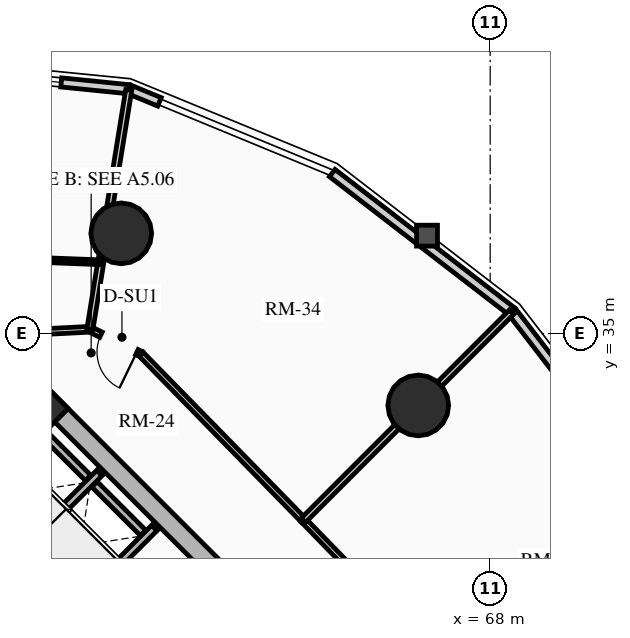
"""IFC4 building model, lengths in metres.
Left out: names, types, materials, properties, quantities, classifications, styles, units other than length and angle.
Written with IfcOpenShell. Run it as: python <this file> out.ifc"""

import sys

from ifc_helpers import new_model, si_unit, direction, frame, frame_2d, origin, origin_2d, place, context, subcontext, project, spatial, rectangle, circle, extrude, source, transform, mapped, element, fill, save


model = new_model("IFC4")
c1 = context("Model", 3, precision=1e-05, world=origin(), true_north=direction((0.0, 1.0)))
c2 = subcontext(c1, "Body", "Model", "MODEL_VIEW")
j1 = project(units=[si_unit("LENGTHUNIT", "METRE"), si_unit("PLANEANGLEUNIT", "RADIAN")], contexts=[c1])
p1 = place(None, origin())
s1 = spatial("IfcSite", under=j1, at=p1, CompositionType="ELEMENT")
p2 = place(p1, origin())
s2 = spatial("IfcBuilding", under=s1, at=p2, CompositionType="ELEMENT")
p3 = place(p2, frame((0.0, 0.0, 59.83)))
s3 = spatial("IfcBuildingStorey", under=s2, at=p3, CompositionType="ELEMENT", Elevation=59.83)
p4 = place(p3, frame((66.339, 23.227, 0.0), z_axis=(0.0, 0.0, 1.0), x_axis=(-0.707106781187, 0.707106781187, 0.0)))
e1 = element("IfcWall", 1, at=p4, inside=s3, PredefinedType="SHEAR", context=c2, shape_type="SweptSolid", body=[
    extrude(rectangle(XDim=14.3, YDim=0.5, at=frame_2d((7.15, 0.0))), origin(), (0.0, 0.0, 1.0), 2.91),
])
p5 = place(p3, frame((48.838, 25.596, 0.0), z_axis=(0.0, 0.0, 1.0), x_axis=(0.707106781187, 0.707106781187, 0.0)))
e2 = element("IfcWall", 2, at=p5, inside=s3, PredefinedType="SHEAR", context=c2, shape_type="SweptSolid", body=[
    extrude(rectangle(XDim=10.7, YDim=0.5, at=frame_2d((5.35, 0.0))), origin(), (0.0, 0.0, 1.0), 2.91),
])
m1 = source(origin(), c2, "Body", "SweptSolid", [
    extrude(rectangle(XDim=1.5, YDim=2.02, at=frame_2d((0.75, 1.01))), frame((0.0, 0.26, 0.0), z_axis=(0.0, -1.0, 0.0), x_axis=(1.0, 0.0, 0.0)), (0.0, 0.0, 1.0), 0.52),
])
p6 = place(p5, frame((4.6, 0.0, 0.0)))
e3 = element("IfcOpeningElement", 3, at=p6, cuts=e2, PredefinedType="OPENING", context=c2, shape_type="MappedRepresentation", body=[
    mapped(m1, transform((0.0, 0.0, 0.0), x_axis=(1.0, 0.0, 0.0), y_axis=(0.0, 1.0, 0.0), z_axis=(0.0, 0.0, 1.0), scale=1.0)),
])
p7 = place(p3, frame((63.662, 20.904, 0.0), z_axis=(0.0, 0.0, 1.0), x_axis=(-0.707106781187, 0.707106781187, 0.0)))
e4 = element("IfcWall", 4, at=p7, inside=s3, PredefinedType="SHEAR", context=c2, shape_type="SweptSolid", body=[
    extrude(rectangle(XDim=13.8, YDim=0.35, at=frame_2d((6.9, 0.0))), origin(), (0.0, 0.0, 1.0), 2.91),
])
m2 = source(origin(), c2, "Body", "SweptSolid", [
    extrude(rectangle(XDim=1.1, YDim=2.015, at=frame_2d((0.55, 1.007))), frame((0.0, 0.185, 0.0), z_axis=(0.0, -1.0, 0.0), x_axis=(1.0, 0.0, 0.0)), (0.0, 0.0, 1.0), 0.37),
])
p8 = place(p7, frame((10.025, 0.0, 0.0)))
e5 = element("IfcOpeningElement", 5, at=p8, cuts=e4, PredefinedType="OPENING", context=c2, shape_type="MappedRepresentation", body=[
    mapped(m2, transform((0.0, 0.0, 0.0), x_axis=(1.0, 0.0, 0.0), y_axis=(0.0, 1.0, 0.0), z_axis=(0.0, 0.0, 1.0), scale=1.0)),
])
p9 = place(p7, frame((12.025, 0.0, 0.0)))
e6 = element("IfcOpeningElement", 6, at=p9, cuts=e4, PredefinedType="OPENING", context=c2, shape_type="MappedRepresentation", body=[
    mapped(m2, transform((0.0, 0.0, 0.0), x_axis=(1.0, 0.0, 0.0), y_axis=(0.0, 1.0, 0.0), z_axis=(0.0, 0.0, 1.0), scale=1.0)),
])
m3 = source(origin(), c2, "Body", "SweptSolid", [
    extrude(rectangle(XDim=1.15, YDim=2.02, at=frame_2d((0.575, 1.01))), frame((0.0, 0.185, 0.0), z_axis=(0.0, -1.0, 0.0), x_axis=(1.0, 0.0, 0.0)), (0.0, 0.0, 1.0), 0.37),
])
p10 = place(p7, frame((5.33, 0.0, 0.0)))
e7 = element("IfcOpeningElement", 7, at=p10, cuts=e4, PredefinedType="OPENING", context=c2, shape_type="MappedRepresentation", body=[
    mapped(m3, transform((0.0, 0.0, 0.0), x_axis=(1.0, 0.0, 0.0), y_axis=(0.0, 1.0, 0.0), z_axis=(0.0, 0.0, 1.0), scale=1.0)),
])
p11 = place(p3, frame((56.294, 33.024, 0.0), z_axis=(0.0, 0.0, 1.0), x_axis=(0.707106781187, 0.707106781187, 0.0)))
e8 = element("IfcColumn", 8, at=p11, inside=s3, PredefinedType="COLUMN", context=c2, shape_type="SweptSolid", body=[
    extrude(rectangle(XDim=0.85, YDim=0.85, at=origin_2d()), origin(), (0.0, 0.0, 1.0), 2.91),
])
for number, where, z_axis, x_axis in (
    (9, (66.107, 33.107, 0.0), (0.0, 0.0, 1.0), (1.0, 0.0, 0.0)),
    (10, (58.291, 37.635, 0.0), (0.0, 0.0, 1.0), (1.0, 0.0, 0.0)),
):
    element("IfcColumn", number, at=place(p3, frame(where, z_axis=z_axis, x_axis=x_axis)), inside=s3, PredefinedType="USERDEFINED", context=c2, shape_type="SweptSolid", body=[
        extrude(circle(Radius=0.8, at=origin_2d()), origin(), (0.0, 0.0, 1.0), 2.91),
    ])
p12 = place(p3, frame((63.844, 39.222, 0.0), z_axis=(0.0, 0.0, 1.0), x_axis=(0.792014314407, -0.610502519057, 0.0)))
e11 = element("IfcWall", 11, at=p12, inside=s3, PredefinedType="SOLIDWALL", context=c2, shape_type="SweptSolid", body=[
    extrude(rectangle(XDim=5.973, YDim=0.24, at=frame_2d((2.987, 0.0))), origin(), (0.0, 0.0, 1.0), 2.073),
])
p13 = place(p3, frame((58.493, 41.428, 0.0), z_axis=(0.0, 0.0, 1.0), x_axis=(0.924556017656, -0.381046152345, 0.0)))
e12 = element("IfcWall", 12, at=p13, inside=s3, PredefinedType="SOLIDWALL", context=c2, shape_type="SweptSolid", body=[
    extrude(rectangle(XDim=0.87, YDim=0.24, at=frame_2d((0.435, 0.0))), origin(), (0.0, 0.0, 1.0), 2.073),
])
p14 = place(p3, frame((53.043, 41.976, 0.0), z_axis=(0.0, 0.0, 1.0), x_axis=(0.994970765694, -0.100165739718, 0.0)))
e13 = element("IfcWall", 13, at=p14, inside=s3, PredefinedType="SOLIDWALL", context=c2, shape_type="SweptSolid", body=[
    extrude(rectangle(XDim=5.477, YDim=0.24, at=frame_2d((2.738, 0.0))), origin(), (0.0, 0.0, 1.0), 2.073),
])
m4 = source(origin(), c2, "Body", "SweptSolid", [
    extrude(rectangle(XDim=1.9, YDim=1.35, at=frame_2d((0.95, 0.675))), frame((0.0, 0.13, 0.0), z_axis=(0.0, -1.0, 0.0), x_axis=(1.0, 0.0, 0.0)), (0.0, 0.0, 1.0), 0.26),
])
p15 = place(p14, frame((1.788, 0.0, 0.65)))
e14 = element("IfcOpeningElement", 14, at=p15, cuts=e13, PredefinedType="OPENING", context=c2, shape_type="MappedRepresentation", body=[
    mapped(m4, transform((0.0, 0.0, 0.0), x_axis=(1.0, 0.0, 0.0), y_axis=(0.0, 1.0, 0.0), z_axis=(0.0, 0.0, 1.0), scale=1.0)),
])
p16 = place(p3, frame((68.575, 35.575, 0.0), z_axis=(0.0, 0.0, 1.0), x_axis=(0.610502519057, -0.792014314407, 0.0)))
e15 = element("IfcWall", 15, at=p16, inside=s3, PredefinedType="SOLIDWALL", context=c2, shape_type="SweptSolid", body=[
    extrude(rectangle(XDim=5.973, YDim=0.24, at=frame_2d((2.987, 0.0))), origin(), (0.0, 0.0, 1.0), 2.073),
])
p17 = place(p16, frame((2.037, 0.0, 0.65)))
e16 = element("IfcOpeningElement", 16, at=p17, cuts=e15, PredefinedType="OPENING", context=c2, shape_type="MappedRepresentation", body=[
    mapped(m4, transform((0.0, 0.0, 0.0), x_axis=(1.0, 0.0, 0.0), y_axis=(0.0, 1.0, 0.0), z_axis=(0.0, 0.0, 1.0), scale=1.0)),
])
p18 = place(p3, frame((57.062, 27.781, 0.0), z_axis=(0.0, 0.0, 1.0), x_axis=(0.707106781187, 0.707106781187, 0.0)))
e17 = element("IfcWall", 17, at=p18, inside=s3, PredefinedType="SHEAR", context=c2, shape_type="SweptSolid", body=[
    extrude(rectangle(XDim=2.97, YDim=0.2, at=frame_2d((1.485, 0.0))), origin(), (0.0, 0.0, 1.0), 2.91),
])
p19 = place(p3, frame((55.615, 29.227, 0.0), z_axis=(0.0, 0.0, 1.0), x_axis=(0.707147878904, 0.70706568108, 0.0)))
e18 = element("IfcWall", 18, at=p19, inside=s3, PredefinedType="SHEAR", context=c2, shape_type="SweptSolid", body=[
    extrude(rectangle(XDim=2.97, YDim=0.2, at=frame_2d((1.485, 0.0))), origin(), (0.0, 0.0, 1.0), 2.91),
])
p20 = place(p3, frame((58.865, 29.754, 0.0), z_axis=(0.0, 0.0, 1.0), x_axis=(-0.707174411312, 0.707039144592, 0.0)))
e19 = element("IfcWall", 19, at=p20, inside=s3, PredefinedType="SHEAR", context=c2, shape_type="SweptSolid", body=[
    extrude(rectangle(XDim=1.805, YDim=0.2, at=frame_2d((0.902, 0.0))), origin(), (0.0, 0.0, 1.0), 2.91),
])
p21 = place(p3, frame((57.419, 31.2, 0.0), z_axis=(0.0, 0.0, 1.0), x_axis=(-0.707032117043, 0.707181437447, 0.0)))
e20 = element("IfcWall", 20, at=p21, inside=s3, PredefinedType="SHEAR", context=c2, shape_type="SweptSolid", body=[
    extrude(rectangle(XDim=1.635, YDim=0.2, at=frame_2d((0.817, 0.0))), origin(), (0.0, 0.0, 1.0), 2.91),
])
p22 = place(p3, frame((63.086, 30.086, 0.0), z_axis=(0.0, 0.0, 1.0), x_axis=(-0.699075897379, 0.715047473741, 0.0)))
e21 = element("IfcWall", 21, at=p22, inside=s3, PredefinedType="PARTITIONING", context=c2, shape_type="SweptSolid", body=[
    extrude(rectangle(XDim=6.114, YDim=0.15, at=frame_2d((3.057, 0.0))), origin(), (0.0, 0.0, 1.0), 2.159),
])
p23 = place(p3, frame((58.812, 34.458, 0.0), z_axis=(0.0, 0.0, 1.0), x_axis=(-0.899559490277, 0.436798264021, 0.0)))
e22 = element("IfcWall", 22, at=p23, inside=s3, PredefinedType="PARTITIONING", context=c2, shape_type="SweptSolid", body=[
    extrude(rectangle(XDim=1.495, YDim=0.15, at=frame_2d((0.748, 0.0))), origin(), (0.0, 0.0, 1.0), 2.205),
])
m5 = source(origin(), c2, "Body", "SweptSolid", [
    extrude(rectangle(XDim=1.05, YDim=2.015, at=frame_2d((0.525, 1.007))), frame((0.0, 0.085, 0.0), z_axis=(0.0, -1.0, 0.0), x_axis=(1.0, 0.0, 0.0)), (0.0, 0.0, 1.0), 0.17),
])
p24 = place(p23, frame((0.12, 0.0, 0.0)))
e23 = element("IfcOpeningElement", 23, at=p24, cuts=e22, PredefinedType="OPENING", context=c2, shape_type="MappedRepresentation", body=[
    mapped(m5, transform((0.0, 0.0, 0.0), x_axis=(1.0, 0.0, 0.0), y_axis=(0.0, 1.0, 0.0), z_axis=(0.0, 0.0, 1.0), scale=1.0)),
])
p25 = place(p3, frame((57.467, 35.111, 0.0), z_axis=(0.0, 0.0, 1.0), x_axis=(-0.998691757323, -0.051134859488, 0.0)))
e24 = element("IfcWall", 24, at=p25, inside=s3, PredefinedType="PARTITIONING", context=c2, shape_type="SweptSolid", body=[
    extrude(rectangle(XDim=1.485, YDim=0.15, at=frame_2d((0.742, 0.0))), origin(), (0.0, 0.0, 1.0), 2.159),
])
p26 = place(p3, frame((67.27, 25.78, 0.0), z_axis=(0.0, 0.0, 1.0), x_axis=(-0.696847842907, 0.717218992942, 0.0)))
e25 = element("IfcWall", 25, at=p26, inside=s3, PredefinedType="PARTITIONING", context=c2, shape_type="SweptSolid", body=[
    extrude(rectangle(XDim=6.004, YDim=0.15, at=frame_2d((3.002, 0.0))), origin(), (0.0, 0.0, 1.0), 2.635),
])
m6 = source(origin(), c2, "Body", "SweptSolid", [
    extrude(rectangle(XDim=1.0, YDim=2.015, at=frame_2d((0.5, 1.007))), frame((0.0, 0.085, 0.0), z_axis=(0.0, -1.0, 0.0), x_axis=(1.0, 0.0, 0.0)), (0.0, 0.0, 1.0), 0.17),
])
p27 = place(p26, frame((2.502, 0.0, 0.0)))
e26 = element("IfcOpeningElement", 26, at=p27, cuts=e25, PredefinedType="OPENING", context=c2, shape_type="MappedRepresentation", body=[
    mapped(m6, transform((0.0, 0.0, 0.0), x_axis=(1.0, 0.0, 0.0), y_axis=(0.0, 1.0, 0.0), z_axis=(0.0, 0.0, 1.0), scale=1.0)),
])
p28 = place(p3, frame((63.086, 30.086, 0.0), z_axis=(0.0, 0.0, 1.0), x_axis=(0.707106781187, 0.707106781187, 0.0)))
e27 = element("IfcWall", 27, at=p28, inside=s3, PredefinedType="PARTITIONING", context=c2, shape_type="SweptSolid", body=[
    extrude(rectangle(XDim=7.743, YDim=0.16, at=frame_2d((3.872, 0.0))), origin(), (0.0, 0.0, 1.0), 2.073),
])
p29 = place(p3, frame((57.467, 35.111, 0.0), z_axis=(0.0, 0.0, 1.0), x_axis=(0.160314040356, 0.987066060841, 0.0)))
e28 = element("IfcWall", 28, at=p29, inside=s3, PredefinedType="PARTITIONING", context=c2, shape_type="SweptSolid", body=[
    extrude(rectangle(XDim=6.379, YDim=0.16, at=frame_2d((3.19, 0.0))), origin(), (0.0, 0.0, 1.0), 2.073),
])
p30 = place(p3, frame((57.753, 36.875, 0.0), z_axis=(0.0, 0.0, 1.0), x_axis=(-0.999273083568, 0.038122230487, 0.0)))
e29 = element("IfcWall", 29, at=p30, inside=s3, PredefinedType="PARTITIONING", context=c2, shape_type="SweptSolid", body=[
    extrude(rectangle(XDim=2.594, YDim=0.125, at=frame_2d((1.297, 0.0))), origin(), (0.0, 0.0, 1.0), 2.635),
])
m7 = source(origin(), c2, "Body", "SweptSolid", [
    extrude(rectangle(XDim=1.9, YDim=1.35, at=frame_2d((0.95, 0.675))), frame((0.0, 0.03, 0.0), z_axis=(0.0, -1.0, 0.0), x_axis=(1.0, 0.0, 0.0)), (0.0, 0.0, 1.0), 0.06),
])
p31 = place(p15, origin())
e30 = element("IfcWindow", 30, at=p31, inside=s3, PartitioningType="DOUBLE_PANEL_VERTICAL", PredefinedType="WINDOW", context=c2, shape_type="MappedRepresentation", body=[
    mapped(m7, transform((0.0, 0.0, 0.0), x_axis=(1.0, 0.0, 0.0), y_axis=(0.0, 1.0, 0.0), z_axis=(0.0, 0.0, 1.0), scale=1.0)),
])
fill(e14, e30)
m8 = source(origin(), c2, "Body", "SweptSolid", [
    extrude(rectangle(XDim=1.05, YDim=2.015, at=frame_2d((0.525, 1.007))), frame((0.0, 0.025, 0.0), z_axis=(0.0, -1.0, 0.0), x_axis=(1.0, 0.0, 0.0)), (0.0, 0.0, 1.0), 0.05),
])
p32 = place(p24, origin())
e31 = element("IfcDoor", 31, at=p32, inside=s3, OperationType="SINGLE_SWING_LEFT", PredefinedType="DOOR", context=c2, shape_type="MappedRepresentation", body=[
    mapped(m8, transform((0.0, 0.0, 0.0), x_axis=(1.0, 0.0, 0.0), y_axis=(0.0, 1.0, 0.0), z_axis=(0.0, 0.0, 1.0), scale=1.0)),
])
fill(e23, e31)
save(model, sys.argv[1])
